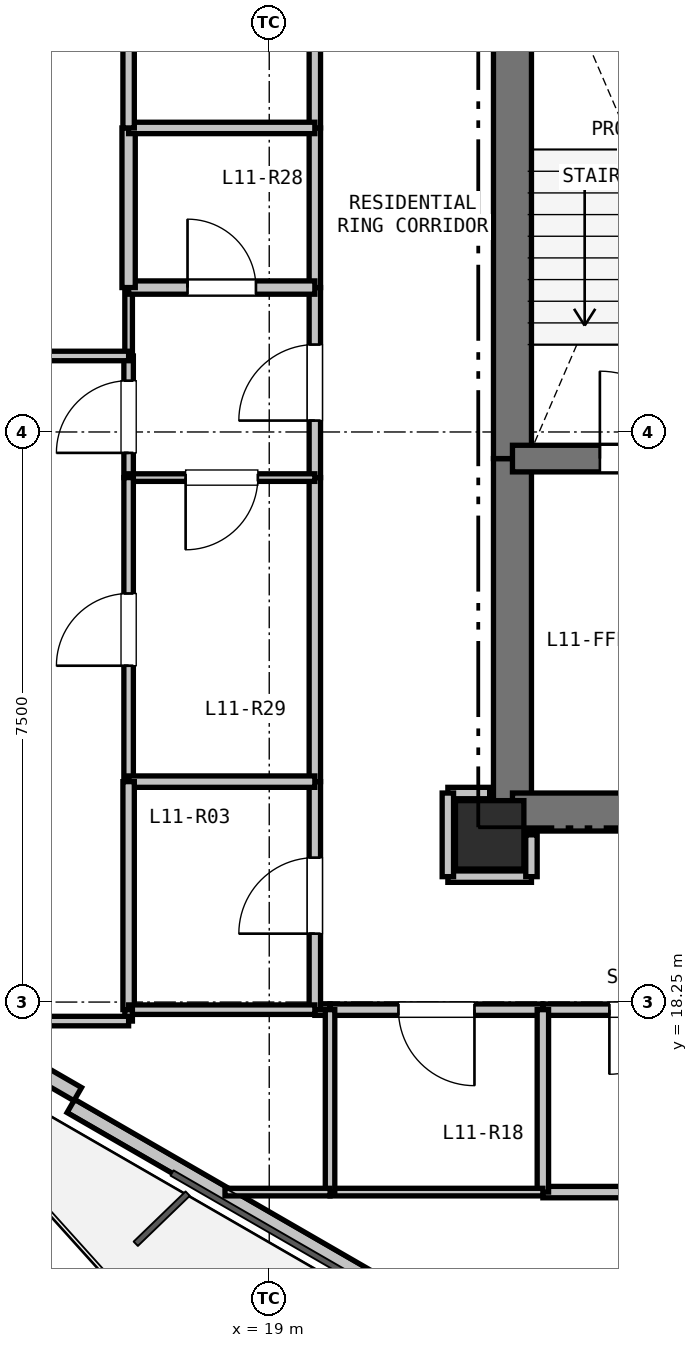
"""IFC4 building model, lengths in metres.
Left out: names, types, materials, properties, quantities, classifications, styles, units other than length and angle.
Written with IfcOpenShell. Run it as: python <this file> out.ifc"""

import sys

from ifc_helpers import new_model, si_unit, direction, frame, frame_2d, origin, origin_2d, place, context, subcontext, project, spatial, rectangle, extrude, element, fill, save


model = new_model("IFC4")
c1 = context("Model", 3, precision=1e-05, world=origin(), true_north=direction((0.0, 1.0)))
c2 = subcontext(c1, "Body", "Model", "MODEL_VIEW")
j1 = project(units=[si_unit("LENGTHUNIT", "METRE"), si_unit("PLANEANGLEUNIT", "RADIAN")], contexts=[c1])
p1 = place(None, origin())
s1 = spatial("IfcSite", under=j1, at=p1, CompositionType="ELEMENT")
p2 = place(p1, origin())
s2 = spatial("IfcBuilding", under=s1, at=p2, CompositionType="ELEMENT")
p3 = place(p2, frame((0.0, 0.0, 42.3)))
s3 = spatial("IfcBuildingStorey", under=s2, at=p3, CompositionType="ELEMENT", Elevation=42.3)
p4 = place(p3, frame((21.9, 20.45, 0.0), z_axis=(0.0, 0.0, 1.0), x_axis=(1.0, 0.0, 0.0)))
e1 = element("IfcColumn", 1, at=p4, inside=s3, PredefinedType="COLUMN", context=c2, shape_type="SweptSolid", body=[
    extrude(rectangle(XDim=0.9, YDim=0.9, at=origin_2d()), origin(), (0.0, 0.0, 1.0), 3.3),
])
p5 = place(p3, frame((26.76, 10.896, 0.0), z_axis=(0.0, 0.0, 1.0), x_axis=(-0.866027351828, 0.499996625875, 0.0)))
e2 = element("IfcWall", 2, at=p5, inside=s3, PredefinedType="PARAPET", context=c2, shape_type="SweptSolid", body=[
    extrude(rectangle(XDim=11.973, YDim=0.2, at=frame_2d((5.987, 0.0))), origin(), (0.0, 0.0, 1.0), 0.2),
])
p6 = place(p3, frame((16.48, 17.039, 0.0), z_axis=(0.0, 0.0, 1.0), x_axis=(-0.86605165483, 0.499954529098, 0.0)))
e3 = element("IfcWall", 3, at=p6, inside=s3, PredefinedType="PARAPET", context=c2, shape_type="SweptSolid", body=[
    extrude(rectangle(XDim=1.7, YDim=0.2, at=frame_2d((0.85, 0.0))), origin(), (0.0, 0.0, 1.0), 2.66),
])
p7 = place(p3, frame((22.2, 20.75, 0.0), z_axis=(0.0, 0.0, 1.0), x_axis=(0.0, 1.0, 0.0)))
e4 = element("IfcWall", 4, at=p7, inside=s3, PredefinedType="SHEAR", context=c2, shape_type="SweptSolid", body=[
    extrude(rectangle(XDim=4.65, YDim=0.5, at=frame_2d((2.325, 0.0))), origin(), (0.0, 0.0, 1.0), 3.04),
])
p8 = place(p3, frame((22.2, 25.4, 0.0), z_axis=(0.0, 0.0, 1.0), x_axis=(0.0, 1.0, 0.0)))
e5 = element("IfcWall", 5, at=p8, inside=s3, PredefinedType="SHEAR", context=c2, shape_type="SweptSolid", body=[
    extrude(rectangle(XDim=7.35, YDim=0.5, at=frame_2d((3.675, 0.0))), origin(), (0.0, 0.0, 1.0), 3.04),
])
p9 = place(p3, frame((25.65, 20.75, 0.0), z_axis=(0.0, 0.0, 1.0), x_axis=(-1.0, 0.0, 0.0)))
e6 = element("IfcWall", 6, at=p9, inside=s3, PredefinedType="SHEAR", context=c2, shape_type="SweptSolid", body=[
    extrude(rectangle(XDim=3.45, YDim=0.5, at=frame_2d((1.725, 0.0))), origin(), (0.0, 0.0, 1.0), 3.04),
])
p10 = place(p9, frame((0.65, 0.0, 0.0)))
e7 = element("IfcOpeningElement", 7, at=p10, cuts=e6, PredefinedType="OPENING", context=c2, shape_type="SweptSolid", body=[
    extrude(rectangle(XDim=1.15, YDim=2.15, at=frame_2d((0.575, 1.075))), frame((0.0, 0.26, 0.0), z_axis=(0.0, -1.0, 0.0), x_axis=(1.0, 0.0, 0.0)), (0.0, 0.0, 1.0), 0.52),
])
p11 = place(p3, frame((22.2, 25.4, 0.0), z_axis=(0.0, 0.0, 1.0), x_axis=(1.0, 0.0, 0.0)))
e8 = element("IfcWall", 8, at=p11, inside=s3, PredefinedType="SHEAR", context=c2, shape_type="SweptSolid", body=[
    extrude(rectangle(XDim=3.45, YDim=0.35, at=frame_2d((1.725, 0.0))), origin(), (0.0, 0.0, 1.0), 3.04),
])
p12 = place(p11, frame((1.15, 0.0, 0.0)))
e9 = element("IfcOpeningElement", 9, at=p12, cuts=e8, PredefinedType="OPENING", context=c2, shape_type="SweptSolid", body=[
    extrude(rectangle(XDim=1.15, YDim=2.15, at=frame_2d((0.575, 1.075))), frame((0.0, 0.185, 0.0), z_axis=(0.0, -1.0, 0.0), x_axis=(1.0, 0.0, 0.0)), (0.0, 0.0, 1.0), 0.37),
])
p13 = place(p3, frame((21.35, 19.9, 0.0), z_axis=(0.0, 0.0, 1.0), x_axis=(1.0, 0.0, 0.0)))
e10 = element("IfcWall", 10, at=p13, inside=s3, PredefinedType="PARTITIONING", context=c2, shape_type="SweptSolid", body=[
    extrude(rectangle(XDim=1.1, YDim=0.15, at=frame_2d((0.55, 0.0))), origin(), (0.0, 0.0, 1.0), 2.337),
])
p14 = place(p3, frame((22.45, 19.9, 0.0), z_axis=(0.0, 0.0, 1.0), x_axis=(0.0, 1.0, 0.0)))
e11 = element("IfcWall", 11, at=p14, inside=s3, PredefinedType="PARTITIONING", context=c2, shape_type="SweptSolid", body=[
    extrude(rectangle(XDim=0.55, YDim=0.15, at=frame_2d((0.275, 0.0))), origin(), (0.0, 0.0, 1.0), 2.337),
])
p15 = place(p3, frame((25.2, 18.15, 0.0), z_axis=(0.0, 0.0, 1.0), x_axis=(-1.0, 0.0, 0.0)))
e12 = element("IfcWall", 12, at=p15, inside=s3, PredefinedType="PARTITIONING", context=c2, shape_type="SweptSolid", body=[
    extrude(rectangle(XDim=2.6, YDim=0.15, at=frame_2d((1.3, 0.0))), origin(), (0.0, 0.0, 1.0), 2.337),
])
p16 = place(p15, frame((0.875, 0.0, 0.0)))
e13 = element("IfcOpeningElement", 13, at=p16, cuts=e12, PredefinedType="OPENING", context=c2, shape_type="SweptSolid", body=[
    extrude(rectangle(XDim=0.85, YDim=2.1, at=frame_2d((0.425, 1.05))), frame((0.0, 0.085, 0.0), z_axis=(0.0, -1.0, 0.0), x_axis=(1.0, 0.0, 0.0)), (0.0, 0.0, 1.0), 0.17),
])
p17 = place(p3, frame((22.6, 18.15, 0.0), z_axis=(0.0, 0.0, 1.0), x_axis=(-1.0, 0.0, 0.0)))
e14 = element("IfcWall", 14, at=p17, inside=s3, PredefinedType="PARTITIONING", context=c2, shape_type="SweptSolid", body=[
    extrude(rectangle(XDim=2.8, YDim=0.15, at=frame_2d((1.4, 0.0))), origin(), (0.0, 0.0, 1.0), 3.04),
])
p18 = place(p17, frame((0.9, 0.0, 0.0)))
e15 = element("IfcOpeningElement", 15, at=p18, cuts=e14, PredefinedType="OPENING", context=c2, shape_type="SweptSolid", body=[
    extrude(rectangle(XDim=1.0, YDim=2.15, at=frame_2d((0.5, 1.075))), frame((0.0, 0.085, 0.0), z_axis=(0.0, -1.0, 0.0), x_axis=(1.0, 0.0, 0.0)), (0.0, 0.0, 1.0), 0.17),
])
p19 = place(p3, frame((19.8, 18.15, 0.0), z_axis=(0.0, 0.0, 1.0), x_axis=(-1.0, 0.0, 0.0)))
e16 = element("IfcWall", 16, at=p19, inside=s3, PredefinedType="PARTITIONING", context=c2, shape_type="SweptSolid", body=[
    extrude(rectangle(XDim=0.2, YDim=0.15, at=frame_2d((0.1, 0.0))), origin(), (0.0, 0.0, 1.0), 3.04),
])
p20 = place(p3, frame((19.6, 18.15, 0.0), z_axis=(0.0, 0.0, 1.0), x_axis=(0.0, 1.0, 0.0)))
e17 = element("IfcWall", 17, at=p20, inside=s3, PredefinedType="PARTITIONING", context=c2, shape_type="SweptSolid", body=[
    extrude(rectangle(XDim=3.0, YDim=0.15, at=frame_2d((1.5, 0.0))), origin(), (0.0, 0.0, 1.0), 2.337),
])
p21 = place(p20, frame((1.0, 0.0, 0.0)))
e18 = element("IfcOpeningElement", 18, at=p21, cuts=e17, PredefinedType="OPENING", context=c2, shape_type="SweptSolid", body=[
    extrude(rectangle(XDim=1.0, YDim=2.15, at=frame_2d((0.5, 1.075))), frame((0.0, 0.085, 0.0), z_axis=(0.0, -1.0, 0.0), x_axis=(1.0, 0.0, 0.0)), (0.0, 0.0, 1.0), 0.17),
])
p22 = place(p3, frame((19.6, 21.15, 0.0), z_axis=(0.0, 0.0, 1.0), x_axis=(0.0, 1.0, 0.0)))
e19 = element("IfcWall", 19, at=p22, inside=s3, PredefinedType="PARTITIONING", context=c2, shape_type="SweptSolid", body=[
    extrude(rectangle(XDim=4.0, YDim=0.15, at=frame_2d((2.0, 0.0))), origin(), (0.0, 0.0, 1.0), 3.04),
])
p23 = place(p3, frame((19.6, 25.15, 0.0), z_axis=(0.0, 0.0, 1.0), x_axis=(0.0, 1.0, 0.0)))
e20 = element("IfcWall", 20, at=p23, inside=s3, PredefinedType="PARTITIONING", context=c2, shape_type="SweptSolid", body=[
    extrude(rectangle(XDim=2.5, YDim=0.15, at=frame_2d((1.25, 0.0))), origin(), (0.0, 0.0, 1.0), 3.04),
])
p24 = place(p23, frame((0.75, 0.0, 0.0)))
e21 = element("IfcOpeningElement", 21, at=p24, cuts=e20, PredefinedType="OPENING", context=c2, shape_type="SweptSolid", body=[
    extrude(rectangle(XDim=1.0, YDim=2.15, at=frame_2d((0.5, 1.075))), frame((0.0, 0.085, 0.0), z_axis=(0.0, -1.0, 0.0), x_axis=(1.0, 0.0, 0.0)), (0.0, 0.0, 1.0), 0.17),
])
p25 = place(p3, frame((19.6, 27.65, 0.0), z_axis=(0.0, 0.0, 1.0), x_axis=(0.0, 1.0, 0.0)))
e22 = element("IfcWall", 22, at=p25, inside=s3, PredefinedType="PARTITIONING", context=c2, shape_type="SweptSolid", body=[
    extrude(rectangle(XDim=2.1, YDim=0.15, at=frame_2d((1.05, 0.0))), origin(), (0.0, 0.0, 1.0), 3.04),
])
p26 = place(p3, frame((19.6, 29.75, 0.0), z_axis=(0.0, 0.0, 1.0), x_axis=(0.0, 1.0, 0.0)))
e23 = element("IfcWall", 23, at=p26, inside=s3, PredefinedType="PARTITIONING", context=c2, shape_type="SweptSolid", body=[
    extrude(rectangle(XDim=5.6, YDim=0.15, at=frame_2d((2.8, 0.0))), origin(), (0.0, 0.0, 1.0), 2.337),
])
p27 = place(p26, frame((2.3, 0.0, 0.0)))
e24 = element("IfcOpeningElement", 24, at=p27, cuts=e23, PredefinedType="OPENING", context=c2, shape_type="SweptSolid", body=[
    extrude(rectangle(XDim=1.0, YDim=2.15, at=frame_2d((0.5, 1.075))), frame((0.0, 0.085, 0.0), z_axis=(0.0, -1.0, 0.0), x_axis=(1.0, 0.0, 0.0)), (0.0, 0.0, 1.0), 0.17),
])
p28 = place(p3, frame((21.9, 21.0, 0.0), z_axis=(0.0, 0.0, 1.0), x_axis=(-1.0, 0.0, 0.0)))
e25 = element("IfcWall", 25, at=p28, inside=s3, PredefinedType="PARTITIONING", context=c2, shape_type="SweptSolid", body=[
    extrude(rectangle(XDim=0.55, YDim=0.15, at=frame_2d((0.275, 0.0))), origin(), (0.0, 0.0, 1.0), 2.488),
])
p29 = place(p3, frame((21.35, 21.0, 0.0), z_axis=(0.0, 0.0, 1.0), x_axis=(0.0, -1.0, 0.0)))
e26 = element("IfcWall", 26, at=p29, inside=s3, PredefinedType="PARTITIONING", context=c2, shape_type="SweptSolid", body=[
    extrude(rectangle(XDim=1.1, YDim=0.15, at=frame_2d((0.55, 0.0))), origin(), (0.0, 0.0, 1.0), 2.337),
])
p30 = place(p3, frame((17.15, 25.15, 0.0), z_axis=(0.0, 0.0, 1.0), x_axis=(0.0, 1.0, 0.0)))
e27 = element("IfcWall", 27, at=p30, inside=s3, PredefinedType="PARTITIONING", context=c2, shape_type="SweptSolid", body=[
    extrude(rectangle(XDim=1.6, YDim=0.125, at=frame_2d((0.8, 0.0))), origin(), (0.0, 0.0, 1.0), 3.04),
])
p31 = place(p30, frame((0.325, 0.0, 0.0)))
e28 = element("IfcOpeningElement", 28, at=p31, cuts=e27, PredefinedType="OPENING", context=c2, shape_type="SweptSolid", body=[
    extrude(rectangle(XDim=0.95, YDim=2.1, at=frame_2d((0.475, 1.05))), frame((0.0, 0.073, 0.0), z_axis=(0.0, -1.0, 0.0), x_axis=(1.0, 0.0, 0.0)), (0.0, 0.0, 1.0), 0.145),
])
p32 = place(p3, frame((17.15, 26.75, 0.0), z_axis=(0.0, 0.0, 1.0), x_axis=(0.0, 1.0, 0.0)))
e29 = element("IfcWall", 29, at=p32, inside=s3, PredefinedType="PARTITIONING", context=c2, shape_type="SweptSolid", body=[
    extrude(rectangle(XDim=0.9, YDim=0.1, at=frame_2d((0.45, 0.0))), origin(), (0.0, 0.0, 1.0), 3.04),
])
p33 = place(p3, frame((17.15, 27.65, 0.0), z_axis=(0.0, 0.0, 1.0), x_axis=(1.0, 0.0, 0.0)))
e30 = element("IfcWall", 30, at=p33, inside=s3, PredefinedType="PLUMBINGWALL", context=c2, shape_type="SweptSolid", body=[
    extrude(rectangle(XDim=2.45, YDim=0.175, at=frame_2d((1.225, 0.0))), origin(), (0.0, 0.0, 1.0), 3.04),
])
p34 = place(p33, frame((0.775, 0.0, 0.0)))
e31 = element("IfcOpeningElement", 31, at=p34, cuts=e30, PredefinedType="OPENING", context=c2, shape_type="SweptSolid", body=[
    extrude(rectangle(XDim=0.9, YDim=2.1, at=frame_2d((0.45, 1.05))), frame((0.0, 0.097, 0.0), z_axis=(0.0, -1.0, 0.0), x_axis=(1.0, 0.0, 0.0)), (0.0, 0.0, 1.0), 0.195),
])
p35 = place(p3, frame((19.6, 25.15, 0.0), z_axis=(0.0, 0.0, 1.0), x_axis=(-1.0, 0.0, 0.0)))
e32 = element("IfcWall", 32, at=p35, inside=s3, PredefinedType="PARTITIONING", context=c2, shape_type="SweptSolid", body=[
    extrude(rectangle(XDim=2.45, YDim=0.1, at=frame_2d((1.225, 0.0))), origin(), (0.0, 0.0, 1.0), 3.04),
])
p36 = place(p35, frame((0.75, 0.0, 0.0)))
e33 = element("IfcOpeningElement", 33, at=p36, cuts=e32, PredefinedType="OPENING", context=c2, shape_type="SweptSolid", body=[
    extrude(rectangle(XDim=0.95, YDim=2.1, at=frame_2d((0.475, 1.05))), frame((0.0, 0.06, 0.0), z_axis=(0.0, -1.0, 0.0), x_axis=(1.0, 0.0, 0.0)), (0.0, 0.0, 1.0), 0.12),
])
p37 = place(p3, frame((17.15, 27.65, 0.0), z_axis=(0.0, 0.0, 1.0), x_axis=(0.0, 1.0, 0.0)))
e34 = element("IfcWall", 34, at=p37, inside=s3, PredefinedType="PLUMBINGWALL", context=c2, shape_type="SweptSolid", body=[
    extrude(rectangle(XDim=2.1, YDim=0.175, at=frame_2d((1.05, 0.0))), origin(), (0.0, 0.0, 1.0), 3.04),
])
p38 = place(p3, frame((17.15, 29.75, 0.0), z_axis=(0.0, 0.0, 1.0), x_axis=(1.0, 0.0, 0.0)))
e35 = element("IfcWall", 35, at=p38, inside=s3, PredefinedType="PARTITIONING", context=c2, shape_type="SweptSolid", body=[
    extrude(rectangle(XDim=2.45, YDim=0.15, at=frame_2d((1.225, 0.0))), origin(), (0.0, 0.0, 1.0), 3.04),
])
p39 = place(p3, frame((17.15, 21.15, 0.0), z_axis=(0.0, 0.0, 1.0), x_axis=(0.0, 1.0, 0.0)))
e36 = element("IfcWall", 36, at=p39, inside=s3, PredefinedType="PARTITIONING", context=c2, shape_type="SweptSolid", body=[
    extrude(rectangle(XDim=4.0, YDim=0.125, at=frame_2d((2.0, 0.0))), origin(), (0.0, 0.0, 1.0), 2.337),
])
p40 = place(p39, frame((1.525, 0.0, 0.0)))
e37 = element("IfcOpeningElement", 37, at=p40, cuts=e36, PredefinedType="OPENING", context=c2, shape_type="SweptSolid", body=[
    extrude(rectangle(XDim=0.95, YDim=2.1, at=frame_2d((0.475, 1.05))), frame((0.0, 0.073, 0.0), z_axis=(0.0, -1.0, 0.0), x_axis=(1.0, 0.0, 0.0)), (0.0, 0.0, 1.0), 0.145),
])
p41 = place(p3, frame((19.6, 21.15, 0.0), z_axis=(0.0, 0.0, 1.0), x_axis=(-1.0, 0.0, 0.0)))
e38 = element("IfcWall", 38, at=p41, inside=s3, PredefinedType="PARTITIONING", context=c2, shape_type="SweptSolid", body=[
    extrude(rectangle(XDim=2.45, YDim=0.15, at=frame_2d((1.225, 0.0))), origin(), (0.0, 0.0, 1.0), 2.337),
])
p42 = place(p3, frame((17.15, 29.75, 0.0), z_axis=(0.0, 0.0, 1.0), x_axis=(0.0, 1.0, 0.0)))
e39 = element("IfcWall", 39, at=p42, inside=s3, PredefinedType="PARTITIONING", context=c2, shape_type="SweptSolid", body=[
    extrude(rectangle(XDim=5.6, YDim=0.15, at=frame_2d((2.8, 0.0))), origin(), (0.0, 0.0, 1.0), 2.337),
])
p43 = place(p3, frame((17.15, 18.15, 0.0), z_axis=(0.0, 0.0, 1.0), x_axis=(0.0, 1.0, 0.0)))
e40 = element("IfcWall", 40, at=p43, inside=s3, PredefinedType="PARTITIONING", context=c2, shape_type="SweptSolid", body=[
    extrude(rectangle(XDim=3.0, YDim=0.15, at=frame_2d((1.5, 0.0))), origin(), (0.0, 0.0, 1.0), 3.04),
])
p44 = place(p3, frame((19.6, 18.15, 0.0), z_axis=(0.0, 0.0, 1.0), x_axis=(-1.0, 0.0, 0.0)))
e41 = element("IfcWall", 41, at=p44, inside=s3, PredefinedType="PARTITIONING", context=c2, shape_type="SweptSolid", body=[
    extrude(rectangle(XDim=2.45, YDim=0.125, at=frame_2d((1.225, 0.0))), origin(), (0.0, 0.0, 1.0), 3.04),
])
p45 = place(p3, frame((25.2, 15.75, 0.0), z_axis=(0.0, 0.0, 1.0), x_axis=(-1.0, 0.0, 0.0)))
e42 = element("IfcWall", 42, at=p45, inside=s3, PredefinedType="PARTITIONING", context=c2, shape_type="SweptSolid", body=[
    extrude(rectangle(XDim=2.6, YDim=0.15, at=frame_2d((1.3, 0.0))), origin(), (0.0, 0.0, 1.0), 3.04),
])
p46 = place(p3, frame((22.6, 15.75, 0.0), z_axis=(0.0, 0.0, 1.0), x_axis=(0.0, 1.0, 0.0)))
e43 = element("IfcWall", 43, at=p46, inside=s3, PredefinedType="PARTITIONING", context=c2, shape_type="SweptSolid", body=[
    extrude(rectangle(XDim=2.4, YDim=0.15, at=frame_2d((1.2, 0.0))), origin(), (0.0, 0.0, 1.0), 3.04),
])
p47 = place(p3, frame((22.6, 15.75, 0.0), z_axis=(0.0, 0.0, 1.0), x_axis=(-1.0, 0.0, 0.0)))
e44 = element("IfcWall", 44, at=p47, inside=s3, PredefinedType="PARTITIONING", context=c2, shape_type="SweptSolid", body=[
    extrude(rectangle(XDim=2.8, YDim=0.1, at=frame_2d((1.4, 0.0))), origin(), (0.0, 0.0, 1.0), 2.65),
])
p48 = place(p3, frame((19.8, 15.75, 0.0), z_axis=(0.0, 0.0, 1.0), x_axis=(0.0, 1.0, 0.0)))
e45 = element("IfcWall", 45, at=p48, inside=s3, PredefinedType="PARTITIONING", context=c2, shape_type="SweptSolid", body=[
    extrude(rectangle(XDim=2.4, YDim=0.125, at=frame_2d((1.2, 0.0))), origin(), (0.0, 0.0, 1.0), 2.65),
])
p49 = place(p3, frame((18.418, 15.75, 0.0), z_axis=(0.0, 0.0, 1.0), x_axis=(1.0, 0.0, 0.0)))
e46 = element("IfcWall", 46, at=p49, inside=s3, PredefinedType="PARTITIONING", context=c2, shape_type="SweptSolid", body=[
    extrude(rectangle(XDim=1.382, YDim=0.1, at=frame_2d((0.691, 0.0))), origin(), (0.0, 0.0, 1.0), 2.365),
])
p50 = place(p3, frame((17.15, 26.75, 0.0), z_axis=(0.0, 0.0, 1.0), x_axis=(-1.0, 0.0, 0.0)))
e47 = element("IfcWall", 47, at=p50, inside=s3, PredefinedType="PARTITIONING", context=c2, shape_type="SweptSolid", body=[
    extrude(rectangle(XDim=6.67, YDim=0.125, at=frame_2d((3.335, 0.0))), origin(), (0.0, 0.0, 1.0), 3.04),
])
p51 = place(p50, frame((2.86, 0.0, 0.0)))
e48 = element("IfcOpeningElement", 48, at=p51, cuts=e47, PredefinedType="OPENING", context=c2, shape_type="SweptSolid", body=[
    extrude(rectangle(XDim=0.95, YDim=2.1, at=frame_2d((0.475, 1.05))), frame((0.0, 0.073, 0.0), z_axis=(0.0, -1.0, 0.0), x_axis=(1.0, 0.0, 0.0)), (0.0, 0.0, 1.0), 0.145),
])
p52 = place(p3, frame((17.15, 18.15, 0.0), z_axis=(0.0, 0.0, 1.0), x_axis=(0.0, -1.0, 0.0)))
e49 = element("IfcWall", 49, at=p52, inside=s3, PredefinedType="PARTITIONING", context=c2, shape_type="SweptSolid", body=[
    extrude(rectangle(XDim=0.15, YDim=0.1, at=frame_2d((0.075, 0.0))), origin(), (0.0, 0.0, 1.0), 3.04),
])
p53 = place(p3, frame((17.15, 18.0, 0.0), z_axis=(0.0, 0.0, 1.0), x_axis=(-1.0, 0.0, 0.0)))
e50 = element("IfcWall", 50, at=p53, inside=s3, PredefinedType="PARTITIONING", context=c2, shape_type="SweptSolid", body=[
    extrude(rectangle(XDim=2.401, YDim=0.125, at=frame_2d((1.2, 0.0))), origin(), (0.0, 0.0, 1.0), 2.365),
])
p54 = place(p12, origin())
e51 = element("IfcDoor", 51, at=p54, inside=s3, OperationType="SINGLE_SWING_LEFT", PredefinedType="DOOR", context=c2, shape_type="SweptSolid", body=[
    extrude(rectangle(XDim=1.15, YDim=2.15, at=frame_2d((0.575, 1.075))), frame((0.0, 0.025, 0.0), z_axis=(0.0, -1.0, 0.0), x_axis=(1.0, 0.0, 0.0)), (0.0, 0.0, 1.0), 0.05),
])
fill(e9, e51)
p55 = place(p24, origin())
e52 = element("IfcDoor", 52, at=p55, inside=s3, OperationType="SINGLE_SWING_LEFT", PredefinedType="DOOR", context=c2, shape_type="SweptSolid", body=[
    extrude(rectangle(XDim=1.0, YDim=2.15, at=frame_2d((0.5, 1.075))), frame((0.0, 0.025, 0.0), z_axis=(0.0, -1.0, 0.0), x_axis=(1.0, 0.0, 0.0)), (0.0, 0.0, 1.0), 0.05),
])
fill(e21, e52)
p56 = place(p21, origin())
e53 = element("IfcDoor", 53, at=p56, inside=s3, OperationType="SINGLE_SWING_LEFT", PredefinedType="DOOR", context=c2, shape_type="SweptSolid", body=[
    extrude(rectangle(XDim=1.0, YDim=2.15, at=frame_2d((0.5, 1.075))), frame((0.0, 0.025, 0.0), z_axis=(0.0, -1.0, 0.0), x_axis=(1.0, 0.0, 0.0)), (0.0, 0.0, 1.0), 0.05),
])
fill(e18, e53)
p57 = place(p16, origin())
e54 = element("IfcDoor", 54, at=p57, inside=s3, OperationType="SINGLE_SWING_RIGHT", PredefinedType="DOOR", context=c2, shape_type="SweptSolid", body=[
    extrude(rectangle(XDim=0.85, YDim=2.1, at=frame_2d((0.425, 1.05))), frame((0.0, 0.025, 0.0), z_axis=(0.0, -1.0, 0.0), x_axis=(1.0, 0.0, 0.0)), (0.0, 0.0, 1.0), 0.05),
])
fill(e13, e54)
p58 = place(p18, origin())
e55 = element("IfcDoor", 55, at=p58, inside=s3, OperationType="SINGLE_SWING_LEFT", PredefinedType="DOOR", context=c2, shape_type="SweptSolid", body=[
    extrude(rectangle(XDim=1.0, YDim=2.15, at=frame_2d((0.5, 1.075))), frame((0.0, 0.025, 0.0), z_axis=(0.0, -1.0, 0.0), x_axis=(1.0, 0.0, 0.0)), (0.0, 0.0, 1.0), 0.05),
])
fill(e15, e55)
p59 = place(p34, origin())
e56 = element("IfcDoor", 56, at=p59, inside=s3, OperationType="SINGLE_SWING_LEFT", PredefinedType="DOOR", context=c2, shape_type="SweptSolid", body=[
    extrude(rectangle(XDim=0.9, YDim=2.1, at=frame_2d((0.45, 1.05))), frame((0.0, 0.025, 0.0), z_axis=(0.0, -1.0, 0.0), x_axis=(1.0, 0.0, 0.0)), (0.0, 0.0, 1.0), 0.05),
])
fill(e31, e56)
p60 = place(p36, origin())
e57 = element("IfcDoor", 57, at=p60, inside=s3, OperationType="SINGLE_SWING_RIGHT", PredefinedType="DOOR", context=c2, shape_type="SweptSolid", body=[
    extrude(rectangle(XDim=0.95, YDim=2.1, at=frame_2d((0.475, 1.05))), frame((0.0, 0.025, 0.0), z_axis=(0.0, -1.0, 0.0), x_axis=(1.0, 0.0, 0.0)), (0.0, 0.0, 1.0), 0.05),
])
fill(e33, e57)
p61 = place(p31, origin())
e58 = element("IfcDoor", 58, at=p61, inside=s3, OperationType="SINGLE_SWING_LEFT", PredefinedType="DOOR", context=c2, shape_type="SweptSolid", body=[
    extrude(rectangle(XDim=0.95, YDim=2.1, at=frame_2d((0.475, 1.05))), frame((0.0, 0.025, 0.0), z_axis=(0.0, -1.0, 0.0), x_axis=(1.0, 0.0, 0.0)), (0.0, 0.0, 1.0), 0.05),
])
fill(e28, e58)
p62 = place(p40, origin())
e59 = element("IfcDoor", 59, at=p62, inside=s3, OperationType="SINGLE_SWING_LEFT", PredefinedType="DOOR", context=c2, shape_type="SweptSolid", body=[
    extrude(rectangle(XDim=0.95, YDim=2.1, at=frame_2d((0.475, 1.05))), frame((0.0, 0.025, 0.0), z_axis=(0.0, -1.0, 0.0), x_axis=(1.0, 0.0, 0.0)), (0.0, 0.0, 1.0), 0.05),
])
fill(e37, e59)
save(model, sys.argv[1])
